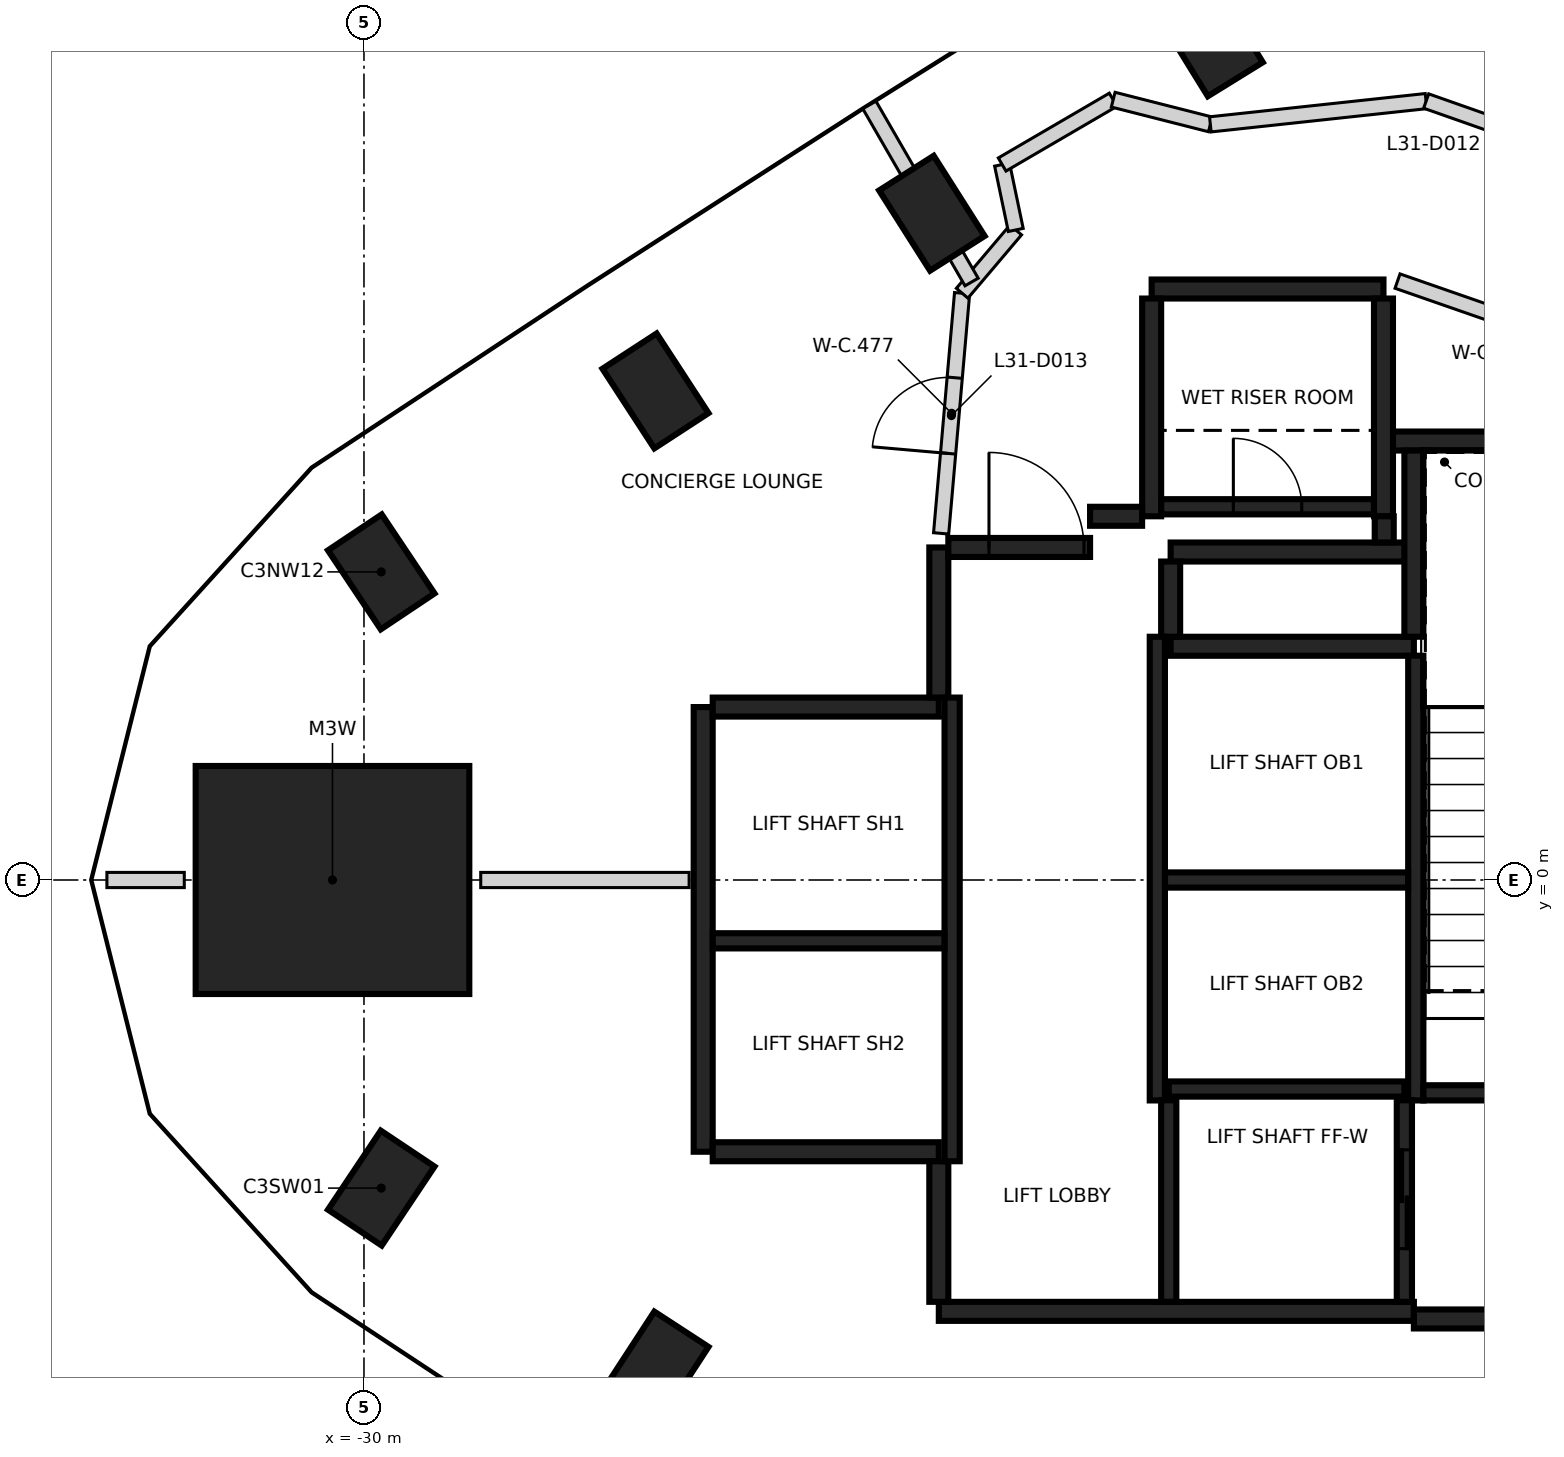
"""IFC4 building model, lengths in metres.
Left out: names, types, materials, properties, quantities, classifications, styles, units other than length and angle.
Written with IfcOpenShell. Run it as: python <this file> out.ifc"""

import sys

from ifc_helpers import new_model, si_unit, direction, frame, frame_2d, origin, origin_2d, place, context, subcontext, project, spatial, rectangle, extrude, element, fill, save


model = new_model("IFC4")
c1 = context("Model", 3, precision=1e-05, world=origin(), true_north=direction((0.0, 1.0)))
c2 = subcontext(c1, "Body", "Model", "MODEL_VIEW")
j1 = project(units=[si_unit("LENGTHUNIT", "METRE"), si_unit("PLANEANGLEUNIT", "RADIAN")], contexts=[c1])
p1 = place(None, origin())
s1 = spatial("IfcSite", under=j1, at=p1, CompositionType="ELEMENT")
p2 = place(p1, origin())
s2 = spatial("IfcBuilding", under=s1, at=p2, CompositionType="ELEMENT")
p3 = place(p2, frame((0.0, 0.0, 128.8)))
s3 = spatial("IfcBuildingStorey", under=s2, at=p3, CompositionType="ELEMENT", Elevation=128.8)
for number, where, z_axis, x_axis in (
    (1, (-18.865, 11.066, -0.4), (0.0, 0.0, 1.0), (-0.526, 0.851, 0.0)),
    (2, (-22.529, 8.772, -0.4), (0.0, 0.0, 1.0), (-0.536, 0.844, 0.0)),
    (3, (-26.165, 6.434, -0.4), (0.0, 0.0, 1.0), (-0.546, 0.838, 0.0)),
    (4, (-29.773, 4.053, -0.4), (0.0, 0.0, 1.0), (-0.556, 0.831, 0.0)),
    (5, (-29.773, -4.053, -0.4), (0.0, 0.0, 1.0), (0.556, 0.831, 0.0)),
    (6, (-26.165, -6.434, -0.4), (0.0, 0.0, 1.0), (0.546, 0.838, 0.0)),
):
    element("IfcColumn", number, at=place(p3, frame(where, z_axis=z_axis, x_axis=x_axis)), inside=s3, PredefinedType="COLUMN", context=c2, shape_type="SweptSolid", body=[
        extrude(rectangle(XDim=1.25, YDim=0.85, at=origin_2d()), origin(), (0.0, 0.0, 1.0), 3.6),
    ])
p4 = place(p3, frame((-30.414, 0.0, -0.4), z_axis=(0.0, 0.0, 1.0), x_axis=(1.0, 0.0, 0.0)))
e7 = element("IfcColumn", 7, at=p4, inside=s3, PredefinedType="COLUMN", context=c2, shape_type="SweptSolid", body=[
    extrude(rectangle(XDim=3.6, YDim=3.0, at=origin_2d()), origin(), (0.0, 0.0, 1.0), 3.6),
])
p5 = place(p3, frame((-16.187, -5.675, 0.0), z_axis=(0.0, 0.0, 1.0), x_axis=(-1.0, 0.0, 0.0)))
e8 = element("IfcWall", 8, at=p5, inside=s3, PredefinedType="SHEAR", context=c2, shape_type="SweptSolid", body=[
    extrude(rectangle(XDim=6.25, YDim=0.25, at=frame_2d((3.125, 0.0))), origin(), (0.0, 0.0, 1.0), 3.2),
])
p6 = place(p3, frame((-25.537, -3.575, 0.0), z_axis=(0.0, 0.0, 1.0), x_axis=(0.0, 1.0, 0.0)))
e9 = element("IfcWall", 9, at=p6, inside=s3, PredefinedType="SHEAR", context=c2, shape_type="SweptSolid", body=[
    extrude(rectangle(XDim=5.85, YDim=0.25, at=frame_2d((2.925, 0.0))), origin(), (0.0, 0.0, 1.0), 3.2),
])
p7 = place(p3, frame((-10.963, -5.775, 0.0), z_axis=(0.0, 0.0, 1.0), x_axis=(-1.0, 0.0, 0.0)))
e10 = element("IfcWall", 10, at=p7, inside=s3, PredefinedType="SHEAR", context=c2, shape_type="SweptSolid", body=[
    extrude(rectangle(XDim=5.225, YDim=0.25, at=frame_2d((2.612, 0.0))), origin(), (0.0, 0.0, 1.0), 3.2),
])
p8 = place(p3, frame((-16.472, 5.775, 0.0), z_axis=(0.0, 0.0, 1.0), x_axis=(1.0, 0.0, 0.0)))
e11 = element("IfcWall", 11, at=p8, inside=s3, PredefinedType="SHEAR", context=c2, shape_type="SweptSolid", body=[
    extrude(rectangle(XDim=5.51, YDim=0.25, at=frame_2d((2.755, 0.0))), origin(), (0.0, 0.0, 1.0), 3.2),
])
p9 = place(p3, frame((-19.387, 3.075, 0.0), z_axis=(0.0, 0.0, 1.0), x_axis=(1.0, 0.0, 0.0)))
e12 = element("IfcWall", 12, at=p9, inside=s3, PredefinedType="SHEAR", context=c2, shape_type="SweptSolid", body=[
    extrude(rectangle(XDim=3.2, YDim=0.25, at=frame_2d((1.6, 0.0))), origin(), (0.0, 0.0, 1.0), 3.2),
])
for number, where, z_axis, x_axis in (
    (13, (-22.437, -3.575, 0.0), (0.0, 0.0, 1.0), (-1.0, 0.0, 0.0)),
    (14, (-25.412, 2.275, 0.0), (0.0, 0.0, 1.0), (1.0, 0.0, 0.0)),
):
    element("IfcWall", number, at=place(p3, frame(where, z_axis=z_axis, x_axis=x_axis)), inside=s3, PredefinedType="SHEAR", context=c2, shape_type="SweptSolid", body=[
        extrude(rectangle(XDim=2.975, YDim=0.25, at=frame_2d((1.487, 0.0))), origin(), (0.0, 0.0, 1.0), 3.2),
    ])
p10 = place(p3, frame((-19.637, 7.775, 0.0), z_axis=(0.0, 0.0, 1.0), x_axis=(1.0, 0.0, 0.0)))
e15 = element("IfcWall", 15, at=p10, inside=s3, PredefinedType="SHEAR", context=c2, shape_type="SweptSolid", body=[
    extrude(rectangle(XDim=3.05, YDim=0.25, at=frame_2d((1.525, 0.0))), origin(), (0.0, 0.0, 1.0), 3.2),
])
for number, where, z_axis, x_axis in (
    (16, (-16.587, 7.65, 0.0), (0.0, 0.0, 1.0), (0.0, -1.0, 0.0)),
    (17, (-19.637, 4.785, 0.0), (0.0, 0.0, 1.0), (0.0, 1.0, 0.0)),
):
    element("IfcWall", number, at=place(p3, frame(where, z_axis=z_axis, x_axis=x_axis)), inside=s3, PredefinedType="SHEAR", context=c2, shape_type="SweptSolid", body=[
        extrude(rectangle(XDim=2.865, YDim=0.25, at=frame_2d((1.432, 0.0))), origin(), (0.0, 0.0, 1.0), 3.2),
    ])
p11 = place(p3, frame((-16.302, 4.315, 0.0), z_axis=(0.0, 0.0, 1.0), x_axis=(-1.0, 0.0, 0.0)))
e18 = element("IfcWall", 18, at=p11, inside=s3, PredefinedType="SHEAR", context=c2, shape_type="SweptSolid", body=[
    extrude(rectangle(XDim=3.085, YDim=0.25, at=frame_2d((1.542, 0.0))), origin(), (0.0, 0.0, 1.0), 3.2),
])
p12 = place(p3, frame((-16.187, 3.2, 0.0), z_axis=(0.0, 0.0, 1.0), x_axis=(0.0, 1.0, 0.0)))
e19 = element("IfcWall", 19, at=p12, inside=s3, PredefinedType="SHEAR", context=c2, shape_type="SweptSolid", body=[
    extrude(rectangle(XDim=2.449, YDim=0.25, at=frame_2d((1.225, 0.0))), origin(), (0.0, 0.0, 1.0), 3.2),
])
p13 = place(p3, frame((-22.437, 2.4, 0.0), z_axis=(0.0, 0.0, 1.0), x_axis=(0.0, 1.0, 0.0)))
e20 = element("IfcWall", 20, at=p13, inside=s3, PredefinedType="SHEAR", context=c2, shape_type="SweptSolid", body=[
    extrude(rectangle(XDim=1.975, YDim=0.25, at=frame_2d((0.987, 0.0))), origin(), (0.0, 0.0, 1.0), 3.2),
])
p14 = place(p3, frame((-22.437, -5.55, 0.0), z_axis=(0.0, 0.0, 1.0), x_axis=(0.0, 1.0, 0.0)))
e21 = element("IfcWall", 21, at=p14, inside=s3, PredefinedType="SHEAR", context=c2, shape_type="SweptSolid", body=[
    extrude(rectangle(XDim=1.849, YDim=0.25, at=frame_2d((0.925, 0.0))), origin(), (0.0, 0.0, 1.0), 3.2),
])
p15 = place(p3, frame((-22.312, 4.375, 0.0), z_axis=(0.0, 0.0, 1.0), x_axis=(1.0, 0.0, 0.0)))
e22 = element("IfcWall", 22, at=p15, inside=s3, PredefinedType="SHEAR", context=c2, shape_type="SweptSolid", body=[
    extrude(rectangle(XDim=1.865, YDim=0.25, at=frame_2d((0.932, 0.0))), origin(), (0.0, 0.0, 1.0), 3.2),
])
p16 = place(p15, frame((0.535, 0.0, 0.0)))
e23 = element("IfcOpeningElement", 23, at=p16, cuts=e22, PredefinedType="OPENING", context=c2, shape_type="SweptSolid", body=[
    extrude(rectangle(XDim=1.25, YDim=2.1, at=frame_2d((0.625, 1.05))), frame((0.0, 0.135, 0.0), z_axis=(0.0, -1.0, 0.0), x_axis=(1.0, 0.0, 0.0)), (0.0, 0.0, 1.0), 0.27),
])
p17 = place(p3, frame((-19.387, 4.19, 0.0), z_axis=(0.0, 0.0, 1.0), x_axis=(0.0, -1.0, 0.0)))
e24 = element("IfcWall", 24, at=p17, inside=s3, PredefinedType="SHEAR", context=c2, shape_type="SweptSolid", body=[
    extrude(rectangle(XDim=0.989, YDim=0.25, at=frame_2d((0.495, 0.0))), origin(), (0.0, 0.0, 1.0), 3.2),
])
p18 = place(p3, frame((-20.447, 4.785, 0.0), z_axis=(0.0, 0.0, 1.0), x_axis=(1.0, 0.0, 0.0)))
e25 = element("IfcWall", 25, at=p18, inside=s3, PredefinedType="SHEAR", context=c2, shape_type="SweptSolid", body=[
    extrude(rectangle(XDim=0.685, YDim=0.25, at=frame_2d((0.342, 0.0))), origin(), (0.0, 0.0, 1.0), 3.2),
])
p19 = place(p3, frame((-16.577, 4.785, 0.0), z_axis=(0.0, 0.0, 1.0), x_axis=(0.0, -1.0, 0.0)))
e26 = element("IfcWall", 26, at=p19, inside=s3, PredefinedType="SHEAR", context=c2, shape_type="SweptSolid", body=[
    extrude(rectangle(XDim=0.344, YDim=0.25, at=frame_2d((0.172, 0.0))), origin(), (0.0, 0.0, 1.0), 3.2),
])
p20 = place(p3, frame((-16.162, 2.951, 0.0), z_axis=(0.0, 0.0, 1.0), x_axis=(0.0, -1.0, 0.0)))
e27 = element("IfcWall", 27, at=p20, inside=s3, PredefinedType="SHEAR", context=c2, shape_type="SweptSolid", body=[
    extrude(rectangle(XDim=5.851, YDim=0.2, at=frame_2d((2.925, 0.0))), origin(), (0.0, 0.0, 1.0), 3.2),
])
for number, where, z_axis, x_axis in (
    (28, (-19.562, -2.9, 0.0), (0.0, 0.0, 1.0), (0.0, 1.0, 0.0)),
    (29, (-22.262, 2.4, 0.0), (0.0, 0.0, 1.0), (0.0, -1.0, 0.0)),
):
    element("IfcWall", number, at=place(p3, frame(where, z_axis=z_axis, x_axis=x_axis)), inside=s3, PredefinedType="SHEAR", context=c2, shape_type="SweptSolid", body=[
        extrude(rectangle(XDim=6.1, YDim=0.2, at=frame_2d((3.05, 0.0))), origin(), (0.0, 0.0, 1.0), 3.2),
    ])
p21 = place(p3, frame((-10.963, -2.8, 0.0), z_axis=(0.0, 0.0, 1.0), x_axis=(-1.0, 0.0, 0.0)))
e30 = element("IfcWall", 30, at=p21, inside=s3, PredefinedType="SHEAR", context=c2, shape_type="SweptSolid", body=[
    extrude(rectangle(XDim=5.098, YDim=0.2, at=frame_2d((2.549, 0.0))), origin(), (0.0, 0.0, 1.0), 3.2),
])
p22 = place(p21, frame((1.774, 0.0, 0.0)))
e31 = element("IfcOpeningElement", 31, at=p22, cuts=e30, PredefinedType="OPENING", context=c2, shape_type="SweptSolid", body=[
    extrude(rectangle(XDim=1.4, YDim=2.1, at=frame_2d((0.7, 1.05))), frame((0.0, 0.11, 0.0), z_axis=(0.0, -1.0, 0.0), x_axis=(1.0, 0.0, 0.0)), (0.0, 0.0, 1.0), 0.22),
])
p23 = place(p3, frame((-16.263, 0.0, 0.0), z_axis=(0.0, 0.0, 1.0), x_axis=(-1.0, 0.0, 0.0)))
e32 = element("IfcWall", 32, at=p23, inside=s3, PredefinedType="SHEAR", context=c2, shape_type="SweptSolid", body=[
    extrude(rectangle(XDim=3.198, YDim=0.2, at=frame_2d((1.599, 0.0))), origin(), (0.0, 0.0, 1.0), 3.2),
])
p24 = place(p3, frame((-22.363, -0.8, 0.0), z_axis=(0.0, 0.0, 1.0), x_axis=(-1.0, 0.0, 0.0)))
e33 = element("IfcWall", 33, at=p24, inside=s3, PredefinedType="SHEAR", context=c2, shape_type="SweptSolid", body=[
    extrude(rectangle(XDim=3.048, YDim=0.2, at=frame_2d((1.524, 0.0))), origin(), (0.0, 0.0, 1.0), 3.2),
])
p25 = place(p3, frame((-19.511, 4.91, 0.0), z_axis=(0.0, 0.0, 1.0), x_axis=(1.0, 0.0, 0.0)))
e34 = element("IfcWall", 34, at=p25, inside=s3, PredefinedType="SHEAR", context=c2, shape_type="SweptSolid", body=[
    extrude(rectangle(XDim=2.798, YDim=0.2, at=frame_2d((1.399, 0.0))), origin(), (0.0, 0.0, 1.0), 3.2),
])
p26 = place(p25, frame((0.949, 0.0, 0.0)))
e35 = element("IfcOpeningElement", 35, at=p26, cuts=e34, PredefinedType="OPENING", context=c2, shape_type="SweptSolid", body=[
    extrude(rectangle(XDim=0.9, YDim=2.1, at=frame_2d((0.45, 1.05))), frame((0.0, 0.11, 0.0), z_axis=(0.0, -1.0, 0.0), x_axis=(1.0, 0.0, 0.0)), (0.0, 0.0, 1.0), 0.22),
])
p27 = place(p3, frame((-19.412, -2.75, 0.0), z_axis=(0.0, 0.0, 1.0), x_axis=(1.0, 0.0, 0.0)))
e36 = element("IfcWall", 36, at=p27, inside=s3, PredefinedType="SHEAR", context=c2, shape_type="SweptSolid", body=[
    extrude(rectangle(XDim=3.1, YDim=0.2, at=frame_2d((1.55, 0.0))), origin(), (0.0, 0.0, 1.0), 3.2),
])
p28 = place(p3, frame((-16.312, -2.898, 0.0), z_axis=(0.0, 0.0, 1.0), x_axis=(0.0, -1.0, 0.0)))
e37 = element("IfcWall", 37, at=p28, inside=s3, PredefinedType="SHEAR", context=c2, shape_type="SweptSolid", body=[
    extrude(rectangle(XDim=2.651, YDim=0.2, at=frame_2d((1.325, 0.0))), origin(), (0.0, 0.0, 1.0), 3.2),
])
p29 = place(p28, frame((0.652, 0.0, 0.0)))
e38 = element("IfcOpeningElement", 38, at=p29, cuts=e37, PredefinedType="OPENING", context=c2, shape_type="SweptSolid", body=[
    extrude(rectangle(XDim=1.3, YDim=2.1, at=frame_2d((0.65, 1.05))), frame((0.0, 0.11, 0.0), z_axis=(0.0, -1.0, 0.0), x_axis=(1.0, 0.0, 0.0)), (0.0, 0.0, 1.0), 0.22),
])
p30 = place(p3, frame((-19.412, -5.549, 0.0), z_axis=(0.0, 0.0, 1.0), x_axis=(0.0, 1.0, 0.0)))
e39 = element("IfcWall", 39, at=p30, inside=s3, PredefinedType="SHEAR", context=c2, shape_type="SweptSolid", body=[
    extrude(rectangle(XDim=2.651, YDim=0.2, at=frame_2d((1.325, 0.0))), origin(), (0.0, 0.0, 1.0), 3.2),
])
p31 = place(p3, frame((-22.407, 4.56, 0.0), z_axis=(0.0, 0.0, 1.0), x_axis=(0.086898645684, 0.996217157741, 0.0)))
e40 = element("IfcWall", 40, at=p31, inside=s3, PredefinedType="PARTITIONING", context=c2, shape_type="SweptSolid", body=[
    extrude(rectangle(XDim=3.172, YDim=0.2, at=frame_2d((1.586, 0.0))), origin(), (0.0, 0.0, 1.0), 3.2),
])
p32 = place(p31, frame((1.056, 0.0, 0.0)))
e41 = element("IfcOpeningElement", 41, at=p32, cuts=e40, PredefinedType="OPENING", context=c2, shape_type="SweptSolid", body=[
    extrude(rectangle(XDim=1.0, YDim=2.1, at=frame_2d((0.5, 1.05))), frame((0.0, 0.11, 0.0), z_axis=(0.0, -1.0, 0.0), x_axis=(1.0, 0.0, 0.0)), (0.0, 0.0, 1.0), 0.22),
])
p33 = place(p3, frame((-22.13, 7.719, 0.0), z_axis=(0.0, 0.0, 1.0), x_axis=(0.646413536249, 0.762987247701, 0.0)))
e42 = element("IfcWall", 42, at=p33, inside=s3, PredefinedType="PARTITIONING", context=c2, shape_type="SweptSolid", body=[
    extrude(rectangle(XDim=1.091, YDim=0.2, at=frame_2d((0.545, 0.0))), origin(), (0.0, 0.0, 1.0), 3.2),
])
p34 = place(p3, frame((-21.605, 9.412, 0.0), z_axis=(0.0, 0.0, 1.0), x_axis=(0.204764111512, -0.978811349871, 0.0)))
e43 = element("IfcWall", 43, at=p34, inside=s3, PredefinedType="PARTITIONING", context=c2, shape_type="SweptSolid", body=[
    extrude(rectangle(XDim=0.879, YDim=0.2, at=frame_2d((0.439, 0.0))), origin(), (0.0, 0.0, 1.0), 2.3),
])
p35 = place(p3, frame((-21.604, 9.413, 0.0), z_axis=(0.0, 0.0, 1.0), x_axis=(0.863736988548, 0.503942868402, 0.0)))
e44 = element("IfcWall", 44, at=p35, inside=s3, PredefinedType="PARTITIONING", context=c2, shape_type="SweptSolid", body=[
    extrude(rectangle(XDim=1.69, YDim=0.2, at=frame_2d((0.845, 0.0))), origin(), (0.0, 0.0, 1.0), 2.3),
])
p36 = place(p3, frame((-20.143, 10.266, 0.0), z_axis=(0.0, 0.0, 1.0), x_axis=(0.969121308325, -0.246584447505, 0.0)))
e45 = element("IfcWall", 45, at=p36, inside=s3, PredefinedType="PARTITIONING", context=c2, shape_type="SweptSolid", body=[
    extrude(rectangle(XDim=1.319, YDim=0.2, at=frame_2d((0.659, 0.0))), origin(), (0.0, 0.0, 1.0), 2.3),
])
p37 = place(p3, frame((-18.865, 9.941, 0.0), z_axis=(0.0, 0.0, 1.0), x_axis=(0.99423123086, 0.107257911519, 0.0)))
e46 = element("IfcWall", 46, at=p37, inside=s3, PredefinedType="PARTITIONING", context=c2, shape_type="SweptSolid", body=[
    extrude(rectangle(XDim=2.854, YDim=0.2, at=frame_2d((1.427, 0.0))), origin(), (0.0, 0.0, 1.0), 3.2),
])
p38 = place(p3, frame((-16.402, 7.879, 0.0), z_axis=(0.0, 0.0, 1.0), x_axis=(0.944492255471, -0.328533680702, 0.0)))
e47 = element("IfcWall", 47, at=p38, inside=s3, PredefinedType="PARTITIONING", context=c2, shape_type="SweptSolid", body=[
    extrude(rectangle(XDim=5.802, YDim=0.2, at=frame_2d((2.901, 0.0))), origin(), (0.0, 0.0, 1.0), 3.2),
])
p39 = place(p38, frame((2.37, 0.0, 0.0)))
e48 = element("IfcOpeningElement", 48, at=p39, cuts=e47, PredefinedType="OPENING", context=c2, shape_type="SweptSolid", body=[
    extrude(rectangle(XDim=1.0, YDim=2.1, at=frame_2d((0.5, 1.05))), frame((0.0, 0.11, 0.0), z_axis=(0.0, -1.0, 0.0), x_axis=(1.0, 0.0, 0.0)), (0.0, 0.0, 1.0), 0.22),
])
p40 = place(p3, frame((-16.026, 10.248, 0.0), z_axis=(0.0, 0.0, 1.0), x_axis=(0.943234993827, -0.332126100179, 0.0)))
e49 = element("IfcWall", 49, at=p40, inside=s3, PredefinedType="PARTITIONING", context=c2, shape_type="SweptSolid", body=[
    extrude(rectangle(XDim=6.239, YDim=0.2, at=frame_2d((3.119, 0.0))), origin(), (0.0, 0.0, 1.0), 3.2),
])
p41 = place(p40, frame((4.355, 0.0, 0.0)))
e50 = element("IfcOpeningElement", 50, at=p41, cuts=e49, PredefinedType="OPENING", context=c2, shape_type="SweptSolid", body=[
    extrude(rectangle(XDim=1.0, YDim=2.1, at=frame_2d((0.5, 1.05))), frame((0.0, 0.11, 0.0), z_axis=(0.0, -1.0, 0.0), x_axis=(1.0, 0.0, 0.0)), (0.0, 0.0, 1.0), 0.22),
])
p42 = place(p40, frame((1.251, 0.0, 0.0)))
e51 = element("IfcOpeningElement", 51, at=p42, cuts=e49, PredefinedType="OPENING", context=c2, shape_type="SweptSolid", body=[
    extrude(rectangle(XDim=1.0, YDim=2.1, at=frame_2d((0.5, 1.05))), frame((0.0, 0.11, 0.0), z_axis=(0.0, -1.0, 0.0), x_axis=(1.0, 0.0, 0.0)), (0.0, 0.0, 1.0), 0.22),
])
p43 = place(p3, frame((-33.382, 0.0, 0.0), z_axis=(0.0, 0.0, 1.0), x_axis=(1.0, 0.0, 0.0)))
e52 = element("IfcWall", 52, at=p43, inside=s3, PredefinedType="PARTITIONING", context=c2, shape_type="SweptSolid", body=[
    extrude(rectangle(XDim=1.018, YDim=0.2, at=frame_2d((0.509, 0.0))), origin(), (0.0, 0.0, 1.0), 3.2),
])
p44 = place(p3, frame((-28.464, 0.0, 0.0), z_axis=(0.0, 0.0, 1.0), x_axis=(1.0, 0.0, 0.0)))
e53 = element("IfcWall", 53, at=p44, inside=s3, PredefinedType="PARTITIONING", context=c2, shape_type="SweptSolid", body=[
    extrude(rectangle(XDim=2.742, YDim=0.2, at=frame_2d((1.371, 0.0))), origin(), (0.0, 0.0, 1.0), 3.2),
])
p45 = place(p3, frame((-23.351, 10.197, 0.0), z_axis=(0.0, 0.0, 1.0), x_axis=(0.49992673358, -0.86606770004, 0.0)))
e54 = element("IfcWall", 54, at=p45, inside=s3, PredefinedType="PARTITIONING", context=c2, shape_type="SweptSolid", body=[
    extrude(rectangle(XDim=2.69, YDim=0.2, at=frame_2d((1.345, 0.0))), origin(), (0.0, 0.0, 1.0), 3.2),
])
p46 = place(p3, frame((-15.996, 14.74, 0.0), z_axis=(0.0, 0.0, 1.0), x_axis=(0.499925398456, -0.866068470722, 0.0)))
e55 = element("IfcWall", 55, at=p46, inside=s3, PredefinedType="PARTITIONING", context=c2, shape_type="SweptSolid", body=[
    extrude(rectangle(XDim=6.526, YDim=0.2, at=frame_2d((3.263, 0.0))), origin(), (0.0, 0.0, 1.0), 3.2),
])
p47 = place(p29, origin())
e56 = element("IfcDoor", 56, at=p47, inside=s3, OperationType="SLIDING_TO_LEFT", PredefinedType="DOOR", context=c2, shape_type="SweptSolid", body=[
    extrude(rectangle(XDim=1.3, YDim=2.1, at=frame_2d((0.65, 1.05))), frame((0.0, 0.025, 0.0), z_axis=(0.0, -1.0, 0.0), x_axis=(1.0, 0.0, 0.0)), (0.0, 0.0, 1.0), 0.05),
])
fill(e38, e56)
p48 = place(p16, origin())
e57 = element("IfcDoor", 57, at=p48, inside=s3, OperationType="SINGLE_SWING_LEFT", PredefinedType="DOOR", context=c2, shape_type="SweptSolid", body=[
    extrude(rectangle(XDim=1.25, YDim=2.1, at=frame_2d((0.625, 1.05))), frame((0.0, 0.025, 0.0), z_axis=(0.0, -1.0, 0.0), x_axis=(1.0, 0.0, 0.0)), (0.0, 0.0, 1.0), 0.05),
])
fill(e23, e57)
p49 = place(p26, origin())
e58 = element("IfcDoor", 58, at=p49, inside=s3, OperationType="SINGLE_SWING_RIGHT", PredefinedType="DOOR", context=c2, shape_type="SweptSolid", body=[
    extrude(rectangle(XDim=0.9, YDim=2.1, at=frame_2d((0.45, 1.05))), frame((0.0, 0.025, 0.0), z_axis=(0.0, -1.0, 0.0), x_axis=(1.0, 0.0, 0.0)), (0.0, 0.0, 1.0), 0.05),
])
fill(e35, e58)
p50 = place(p32, origin())
e59 = element("IfcDoor", 59, at=p50, inside=s3, OperationType="SINGLE_SWING_LEFT", PredefinedType="DOOR", context=c2, shape_type="SweptSolid", body=[
    extrude(rectangle(XDim=1.0, YDim=2.1, at=frame_2d((0.5, 1.05))), frame((0.0, 0.025, 0.0), z_axis=(0.0, -1.0, 0.0), x_axis=(1.0, 0.0, 0.0)), (0.0, 0.0, 1.0), 0.05),
])
fill(e41, e59)
save(model, sys.argv[1])
